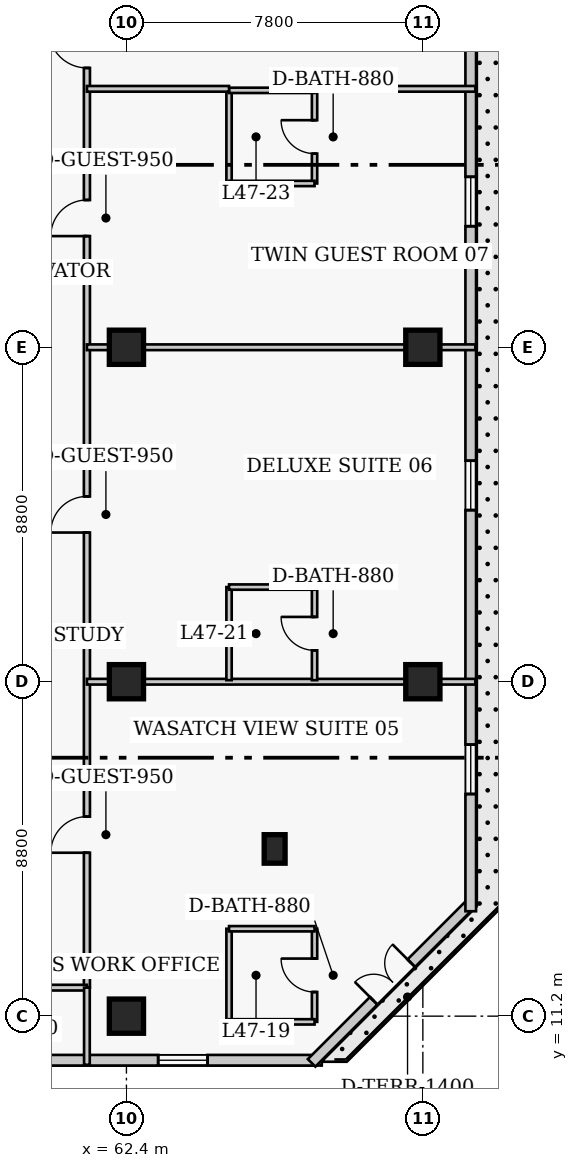
"""IFC4 building model, lengths in metres.
Left out: names, types, materials, properties, quantities, classifications, styles, units other than length and angle.
Written with IfcOpenShell. Run it as: python <this file> out.ifc"""

import sys

from ifc_helpers import new_model, si_unit, direction, frame, frame_2d, origin, origin_2d, place, context, subcontext, project, spatial, rectangle, extrude, element, fill, save


model = new_model("IFC4")
c1 = context("Model", 3, precision=1e-05, world=origin(), true_north=direction((0.0, 1.0)))
c2 = subcontext(c1, "Body", "Model", "MODEL_VIEW")
j1 = project(units=[si_unit("LENGTHUNIT", "METRE"), si_unit("PLANEANGLEUNIT", "RADIAN")], contexts=[c1])
p1 = place(None, origin())
s1 = spatial("IfcSite", under=j1, at=p1, CompositionType="ELEMENT")
p2 = place(p1, origin())
s2 = spatial("IfcBuilding", under=s1, at=p2, CompositionType="ELEMENT")
p3 = place(p2, frame((0.0, 0.0, 189.0)))
s3 = spatial("IfcBuildingStorey", under=s2, at=p3, CompositionType="ELEMENT", Elevation=189.0)
for number, where, z_axis, x_axis in (
    (1, (62.4, 11.2, 0.0), (0.0, 0.0, 1.0), (1.0, 0.0, 0.0)),
    (2, (62.4, 20.0, 0.0), (0.0, 0.0, 1.0), (1.0, 0.0, 0.0)),
    (3, (62.4, 28.8, 0.0), (0.0, 0.0, 1.0), (1.0, 0.0, 0.0)),
    (4, (70.2, 20.0, 0.0), (0.0, 0.0, 1.0), (1.0, 0.0, 0.0)),
    (5, (70.2, 28.8, 0.0), (0.0, 0.0, 1.0), (1.0, 0.0, 0.0)),
):
    element("IfcColumn", number, at=place(p3, frame(where, z_axis=z_axis, x_axis=x_axis)), inside=s3, PredefinedType="COLUMN", context=c2, shape_type="SweptSolid", body=[
        extrude(rectangle(XDim=0.9, YDim=0.9, at=origin_2d()), origin(), (0.0, 0.0, 1.0), 3.9),
    ])
p4 = place(p3, frame((66.3, 15.6, 0.0), z_axis=(0.0, 0.0, 1.0), x_axis=(1.0, 0.0, 0.0)))
e6 = element("IfcColumn", 6, at=p4, inside=s3, PredefinedType="PILASTER", context=c2, shape_type="SweptSolid", body=[
    extrude(rectangle(XDim=0.55, YDim=0.75, at=origin_2d()), origin(), (0.0, 0.0, 1.0), 3.9),
])
p5 = place(p3, frame((41.71, 10.04, 0.0), z_axis=(0.0, 0.0, 1.0), x_axis=(1.0, 0.0, 0.0)))
e7 = element("IfcWall", 7, at=p5, inside=s3, PredefinedType="SOLIDWALL", context=c2, shape_type="SweptSolid", body=[
    extrude(rectangle(XDim=25.83, YDim=0.28, at=frame_2d((12.915, 0.0))), origin(), (0.0, 0.0, 1.0), 3.65),
])
p6 = place(p5, frame((3.005, 0.0, 0.85)))
e8 = element("IfcOpeningElement", 8, at=p6, cuts=e7, PredefinedType="OPENING", context=c2, shape_type="SweptSolid", body=[
    extrude(rectangle(XDim=1.3, YDim=1.7, at=frame_2d((0.65, 0.85))), frame((0.0, 0.15, 0.0), z_axis=(0.0, -1.0, 0.0), x_axis=(1.0, 0.0, 0.0)), (0.0, 0.0, 1.0), 0.3),
])
p7 = place(p5, frame((13.415, 0.0, 0.85)))
e9 = element("IfcOpeningElement", 9, at=p7, cuts=e7, PredefinedType="OPENING", context=c2, shape_type="SweptSolid", body=[
    extrude(rectangle(XDim=1.3, YDim=1.7, at=frame_2d((0.65, 0.85))), frame((0.0, 0.15, 0.0), z_axis=(0.0, -1.0, 0.0), x_axis=(1.0, 0.0, 0.0)), (0.0, 0.0, 1.0), 0.3),
])
p8 = place(p5, frame((21.525, 0.0, 0.85)))
e10 = element("IfcOpeningElement", 10, at=p8, cuts=e7, PredefinedType="OPENING", context=c2, shape_type="SweptSolid", body=[
    extrude(rectangle(XDim=1.3, YDim=1.7, at=frame_2d((0.65, 0.85))), frame((0.0, 0.15, 0.0), z_axis=(0.0, -1.0, 0.0), x_axis=(1.0, 0.0, 0.0)), (0.0, 0.0, 1.0), 0.3),
])
p9 = place(p3, frame((67.273, 9.971, 0.0), z_axis=(0.0, 0.0, 1.0), x_axis=(0.707106781187, 0.707106781187, 0.0)))
e11 = element("IfcWall", 11, at=p9, inside=s3, PredefinedType="SOLIDWALL", context=c2, shape_type="SweptSolid", body=[
    extrude(rectangle(XDim=6.02, YDim=0.28, at=frame_2d((3.01, 0.0))), origin(), (0.0, 0.0, 1.0), 3.65),
])
p10 = place(p9, frame((2.31, 0.0, 0.0)))
e12 = element("IfcOpeningElement", 12, at=p10, cuts=e11, PredefinedType="OPENING", context=c2, shape_type="SweptSolid", body=[
    extrude(rectangle(XDim=1.4, YDim=2.15, at=frame_2d((0.7, 1.075))), frame((0.0, 0.15, 0.0), z_axis=(0.0, -1.0, 0.0), x_axis=(1.0, 0.0, 0.0)), (0.0, 0.0, 1.0), 0.3),
])
p11 = place(p3, frame((71.46, 13.96, 0.0), z_axis=(0.0, 0.0, 1.0), x_axis=(0.0, 1.0, 0.0)))
e13 = element("IfcWall", 13, at=p11, inside=s3, PredefinedType="SOLIDWALL", context=c2, shape_type="SweptSolid", body=[
    extrude(rectangle(XDim=29.88, YDim=0.28, at=frame_2d((14.94, 0.0))), origin(), (0.0, 0.0, 1.0), 3.65),
])
p12 = place(p11, frame((3.085, 0.0, 0.85)))
e14 = element("IfcOpeningElement", 14, at=p12, cuts=e13, PredefinedType="OPENING", context=c2, shape_type="SweptSolid", body=[
    extrude(rectangle(XDim=1.3, YDim=1.7, at=frame_2d((0.65, 0.85))), frame((0.0, 0.15, 0.0), z_axis=(0.0, -1.0, 0.0), x_axis=(1.0, 0.0, 0.0)), (0.0, 0.0, 1.0), 0.3),
])
p13 = place(p11, frame((10.555, 0.0, 0.85)))
e15 = element("IfcOpeningElement", 15, at=p13, cuts=e13, PredefinedType="OPENING", context=c2, shape_type="SweptSolid", body=[
    extrude(rectangle(XDim=1.3, YDim=1.7, at=frame_2d((0.65, 0.85))), frame((0.0, 0.15, 0.0), z_axis=(0.0, -1.0, 0.0), x_axis=(1.0, 0.0, 0.0)), (0.0, 0.0, 1.0), 0.3),
])
p14 = place(p11, frame((18.025, 0.0, 0.85)))
e16 = element("IfcOpeningElement", 16, at=p14, cuts=e13, PredefinedType="OPENING", context=c2, shape_type="SweptSolid", body=[
    extrude(rectangle(XDim=1.3, YDim=1.7, at=frame_2d((0.65, 0.85))), frame((0.0, 0.15, 0.0), z_axis=(0.0, -1.0, 0.0), x_axis=(1.0, 0.0, 0.0)), (0.0, 0.0, 1.0), 0.3),
])
p15 = place(p11, frame((25.495, 0.0, 0.85)))
e17 = element("IfcOpeningElement", 17, at=p15, cuts=e13, PredefinedType="OPENING", context=c2, shape_type="SweptSolid", body=[
    extrude(rectangle(XDim=1.3, YDim=1.7, at=frame_2d((0.65, 0.85))), frame((0.0, 0.15, 0.0), z_axis=(0.0, -1.0, 0.0), x_axis=(1.0, 0.0, 0.0)), (0.0, 0.0, 1.0), 0.3),
])
p16 = place(p3, frame((61.36, 11.95, 0.0), z_axis=(0.0, 0.0, 1.0), x_axis=(0.0, 1.0, 0.0)))
e18 = element("IfcWall", 18, at=p16, inside=s3, PredefinedType="PARTITIONING", context=c2, shape_type="SweptSolid", body=[
    extrude(rectangle(XDim=28.7, YDim=0.16, at=frame_2d((14.35, 0.0))), origin(), (0.0, 0.0, 1.0), 3.65),
])
p17 = place(p16, frame((3.55, 0.0, 0.0)))
e19 = element("IfcOpeningElement", 19, at=p17, cuts=e18, PredefinedType="OPENING", context=c2, shape_type="SweptSolid", body=[
    extrude(rectangle(XDim=0.95, YDim=2.1, at=frame_2d((0.475, 1.05))), frame((0.0, 0.09, 0.0), z_axis=(0.0, -1.0, 0.0), x_axis=(1.0, 0.0, 0.0)), (0.0, 0.0, 1.0), 0.18),
])
p18 = place(p16, frame((11.975, 0.0, 0.0)))
e20 = element("IfcOpeningElement", 20, at=p18, cuts=e18, PredefinedType="OPENING", context=c2, shape_type="SweptSolid", body=[
    extrude(rectangle(XDim=0.95, YDim=2.1, at=frame_2d((0.475, 1.05))), frame((0.0, 0.09, 0.0), z_axis=(0.0, -1.0, 0.0), x_axis=(1.0, 0.0, 0.0)), (0.0, 0.0, 1.0), 0.18),
])
p19 = place(p16, frame((19.775, 0.0, 0.0)))
e21 = element("IfcOpeningElement", 21, at=p19, cuts=e18, PredefinedType="OPENING", context=c2, shape_type="SweptSolid", body=[
    extrude(rectangle(XDim=0.95, YDim=2.1, at=frame_2d((0.475, 1.05))), frame((0.0, 0.09, 0.0), z_axis=(0.0, -1.0, 0.0), x_axis=(1.0, 0.0, 0.0)), (0.0, 0.0, 1.0), 0.18),
])
p20 = place(p16, frame((24.2, 0.0, 0.0)))
e22 = element("IfcOpeningElement", 22, at=p20, cuts=e18, PredefinedType="OPENING", context=c2, shape_type="SweptSolid", body=[
    extrude(rectangle(XDim=1.0, YDim=2.15, at=frame_2d((0.5, 1.075))), frame((0.0, 0.09, 0.0), z_axis=(0.0, -1.0, 0.0), x_axis=(1.0, 0.0, 0.0)), (0.0, 0.0, 1.0), 0.18),
])
p21 = place(p3, frame((59.14, 11.95, 0.0), z_axis=(0.0, 0.0, 1.0), x_axis=(1.0, 0.0, 0.0)))
e23 = element("IfcWall", 23, at=p21, inside=s3, PredefinedType="PARTITIONING", context=c2, shape_type="SweptSolid", body=[
    extrude(rectangle(XDim=2.22, YDim=0.15, at=frame_2d((1.11, 0.0))), origin(), (0.0, 0.0, 1.0), 3.65),
])
p22 = place(p3, frame((61.36, 9.92, 0.0), z_axis=(0.0, 0.0, 1.0), x_axis=(0.0, 1.0, 0.0)))
e24 = element("IfcWall", 24, at=p22, inside=s3, PredefinedType="PARTITIONING", context=c2, shape_type="SweptSolid", body=[
    extrude(rectangle(XDim=2.03, YDim=0.15, at=frame_2d((1.015, 0.0))), origin(), (0.0, 0.0, 1.0), 3.65),
])
p23 = place(p3, frame((65.1, 11.05, 0.0), z_axis=(0.0, 0.0, 1.0), x_axis=(0.0, 1.0, 0.0)))
e25 = element("IfcWall", 25, at=p23, inside=s3, PredefinedType="PLUMBINGWALL", context=c2, shape_type="SweptSolid", body=[
    extrude(rectangle(XDim=2.45, YDim=0.14, at=frame_2d((1.225, 0.0))), origin(), (0.0, 0.0, 1.0), 3.65),
])
p24 = place(p3, frame((67.35, 11.05, 0.0), z_axis=(0.0, 0.0, 1.0), x_axis=(0.0, 1.0, 0.0)))
e26 = element("IfcWall", 26, at=p24, inside=s3, PredefinedType="PLUMBINGWALL", context=c2, shape_type="SweptSolid", body=[
    extrude(rectangle(XDim=2.45, YDim=0.14, at=frame_2d((1.225, 0.0))), origin(), (0.0, 0.0, 1.0), 3.65),
])
p25 = place(p24, frame((0.785, 0.0, 0.0)))
e27 = element("IfcOpeningElement", 27, at=p25, cuts=e26, PredefinedType="OPENING", context=c2, shape_type="SweptSolid", body=[
    extrude(rectangle(XDim=0.88, YDim=2.05, at=frame_2d((0.44, 1.025))), frame((0.0, 0.08, 0.0), z_axis=(0.0, -1.0, 0.0), x_axis=(1.0, 0.0, 0.0)), (0.0, 0.0, 1.0), 0.16),
])
for number, where, z_axis, x_axis in (
    (28, (65.1, 11.05, 0.0), (0.0, 0.0, 1.0), (1.0, 0.0, 0.0)),
    (29, (65.1, 13.5, 0.0), (0.0, 0.0, 1.0), (1.0, 0.0, 0.0)),
):
    element("IfcWall", number, at=place(p3, frame(where, z_axis=z_axis, x_axis=x_axis)), inside=s3, PredefinedType="PLUMBINGWALL", context=c2, shape_type="SweptSolid", body=[
        extrude(rectangle(XDim=2.25, YDim=0.14, at=frame_2d((1.125, 0.0))), origin(), (0.0, 0.0, 1.0), 3.65),
    ])
p26 = place(p3, frame((61.36, 20.0, 0.0), z_axis=(0.0, 0.0, 1.0), x_axis=(1.0, 0.0, 0.0)))
e30 = element("IfcWall", 30, at=p26, inside=s3, PredefinedType="PARTITIONING", context=c2, shape_type="SweptSolid", body=[
    extrude(rectangle(XDim=10.22, YDim=0.15, at=frame_2d((5.11, 0.0))), origin(), (0.0, 0.0, 1.0), 2.878),
])
p27 = place(p3, frame((65.1, 20.04, 0.0), z_axis=(0.0, 0.0, 1.0), x_axis=(0.0, 1.0, 0.0)))
e31 = element("IfcWall", 31, at=p27, inside=s3, PredefinedType="PLUMBINGWALL", context=c2, shape_type="SweptSolid", body=[
    extrude(rectangle(XDim=2.45, YDim=0.14, at=frame_2d((1.225, 0.0))), origin(), (0.0, 0.0, 1.0), 3.65),
])
p28 = place(p3, frame((67.35, 20.04, 0.0), z_axis=(0.0, 0.0, 1.0), x_axis=(0.0, 1.0, 0.0)))
e32 = element("IfcWall", 32, at=p28, inside=s3, PredefinedType="PLUMBINGWALL", context=c2, shape_type="SweptSolid", body=[
    extrude(rectangle(XDim=2.45, YDim=0.14, at=frame_2d((1.225, 0.0))), origin(), (0.0, 0.0, 1.0), 3.65),
])
p29 = place(p28, frame((0.785, 0.0, 0.0)))
e33 = element("IfcOpeningElement", 33, at=p29, cuts=e32, PredefinedType="OPENING", context=c2, shape_type="SweptSolid", body=[
    extrude(rectangle(XDim=0.88, YDim=2.05, at=frame_2d((0.44, 1.025))), frame((0.0, 0.08, 0.0), z_axis=(0.0, -1.0, 0.0), x_axis=(1.0, 0.0, 0.0)), (0.0, 0.0, 1.0), 0.16),
])
p30 = place(p3, frame((65.1, 22.49, 0.0), z_axis=(0.0, 0.0, 1.0), x_axis=(1.0, 0.0, 0.0)))
e34 = element("IfcWall", 34, at=p30, inside=s3, PredefinedType="PLUMBINGWALL", context=c2, shape_type="SweptSolid", body=[
    extrude(rectangle(XDim=2.25, YDim=0.14, at=frame_2d((1.125, 0.0))), origin(), (0.0, 0.0, 1.0), 3.65),
])
p31 = place(p3, frame((61.36, 28.8, 0.0), z_axis=(0.0, 0.0, 1.0), x_axis=(1.0, 0.0, 0.0)))
e35 = element("IfcWall", 35, at=p31, inside=s3, PredefinedType="PARTITIONING", context=c2, shape_type="SweptSolid", body=[
    extrude(rectangle(XDim=10.22, YDim=0.15, at=frame_2d((5.11, 0.0))), origin(), (0.0, 0.0, 1.0), 2.878),
])
p32 = place(p3, frame((65.1, 33.11, 0.0), z_axis=(0.0, 0.0, 1.0), x_axis=(0.0, 1.0, 0.0)))
e36 = element("IfcWall", 36, at=p32, inside=s3, PredefinedType="PLUMBINGWALL", context=c2, shape_type="SweptSolid", body=[
    extrude(rectangle(XDim=2.45, YDim=0.14, at=frame_2d((1.225, 0.0))), origin(), (0.0, 0.0, 1.0), 3.65),
])
p33 = place(p3, frame((67.35, 33.11, 0.0), z_axis=(0.0, 0.0, 1.0), x_axis=(0.0, 1.0, 0.0)))
e37 = element("IfcWall", 37, at=p33, inside=s3, PredefinedType="PLUMBINGWALL", context=c2, shape_type="SweptSolid", body=[
    extrude(rectangle(XDim=2.45, YDim=0.14, at=frame_2d((1.225, 0.0))), origin(), (0.0, 0.0, 1.0), 3.65),
])
p34 = place(p33, frame((0.785, 0.0, 0.0)))
e38 = element("IfcOpeningElement", 38, at=p34, cuts=e37, PredefinedType="OPENING", context=c2, shape_type="SweptSolid", body=[
    extrude(rectangle(XDim=0.88, YDim=2.05, at=frame_2d((0.44, 1.025))), frame((0.0, 0.08, 0.0), z_axis=(0.0, -1.0, 0.0), x_axis=(1.0, 0.0, 0.0)), (0.0, 0.0, 1.0), 0.16),
])
for number, where, z_axis, x_axis in (
    (39, (65.1, 33.11, 0.0), (0.0, 0.0, 1.0), (1.0, 0.0, 0.0)),
    (40, (65.1, 35.56, 0.0), (0.0, 0.0, 1.0), (1.0, 0.0, 0.0)),
):
    element("IfcWall", number, at=place(p3, frame(where, z_axis=z_axis, x_axis=x_axis)), inside=s3, PredefinedType="PLUMBINGWALL", context=c2, shape_type="SweptSolid", body=[
        extrude(rectangle(XDim=2.25, YDim=0.14, at=frame_2d((1.125, 0.0))), origin(), (0.0, 0.0, 1.0), 3.65),
    ])
p35 = place(p3, frame((61.36, 35.6, 0.0), z_axis=(0.0, 0.0, 1.0), x_axis=(1.0, 0.0, 0.0)))
e41 = element("IfcWall", 41, at=p35, inside=s3, PredefinedType="PARTITIONING", context=c2, shape_type="SweptSolid", body=[
    extrude(rectangle(XDim=3.74, YDim=0.15, at=frame_2d((1.87, 0.0))), origin(), (0.0, 0.0, 1.0), 3.65),
])
p36 = place(p3, frame((67.35, 35.6, 0.0), z_axis=(0.0, 0.0, 1.0), x_axis=(1.0, 0.0, 0.0)))
e42 = element("IfcWall", 42, at=p36, inside=s3, PredefinedType="PARTITIONING", context=c2, shape_type="SweptSolid", body=[
    extrude(rectangle(XDim=4.23, YDim=0.15, at=frame_2d((2.115, 0.0))), origin(), (0.0, 0.0, 1.0), 3.65),
])
p37 = place(p8, origin())
e43 = element("IfcWindow", 43, at=p37, inside=s3, PartitioningType="SINGLE_PANEL", PredefinedType="WINDOW", context=c2, shape_type="SweptSolid", body=[
    extrude(rectangle(XDim=1.3, YDim=1.7, at=frame_2d((0.65, 0.85))), frame((0.0, 0.03, 0.0), z_axis=(0.0, -1.0, 0.0), x_axis=(1.0, 0.0, 0.0)), (0.0, 0.0, 1.0), 0.06),
])
fill(e10, e43)
p38 = place(p10, origin())
e44 = element("IfcDoor", 44, at=p38, inside=s3, OperationType="DOUBLE_DOOR_SINGLE_SWING", PredefinedType="DOOR", context=c2, shape_type="SweptSolid", body=[
    extrude(rectangle(XDim=1.4, YDim=2.15, at=frame_2d((0.7, 1.075))), frame((0.0, 0.025, 0.0), z_axis=(0.0, -1.0, 0.0), x_axis=(1.0, 0.0, 0.0)), (0.0, 0.0, 1.0), 0.05),
])
fill(e12, e44)
p39 = place(p12, origin())
e45 = element("IfcWindow", 45, at=p39, inside=s3, PartitioningType="SINGLE_PANEL", PredefinedType="WINDOW", context=c2, shape_type="SweptSolid", body=[
    extrude(rectangle(XDim=1.3, YDim=1.7, at=frame_2d((0.65, 0.85))), frame((0.0, 0.03, 0.0), z_axis=(0.0, -1.0, 0.0), x_axis=(1.0, 0.0, 0.0)), (0.0, 0.0, 1.0), 0.06),
])
fill(e14, e45)
p40 = place(p13, origin())
e46 = element("IfcWindow", 46, at=p40, inside=s3, PartitioningType="SINGLE_PANEL", PredefinedType="WINDOW", context=c2, shape_type="SweptSolid", body=[
    extrude(rectangle(XDim=1.3, YDim=1.7, at=frame_2d((0.65, 0.85))), frame((0.0, 0.03, 0.0), z_axis=(0.0, -1.0, 0.0), x_axis=(1.0, 0.0, 0.0)), (0.0, 0.0, 1.0), 0.06),
])
fill(e15, e46)
p41 = place(p14, origin())
e47 = element("IfcWindow", 47, at=p41, inside=s3, PartitioningType="SINGLE_PANEL", PredefinedType="WINDOW", context=c2, shape_type="SweptSolid", body=[
    extrude(rectangle(XDim=1.3, YDim=1.7, at=frame_2d((0.65, 0.85))), frame((0.0, 0.03, 0.0), z_axis=(0.0, -1.0, 0.0), x_axis=(1.0, 0.0, 0.0)), (0.0, 0.0, 1.0), 0.06),
])
fill(e16, e47)
p42 = place(p25, origin())
e48 = element("IfcDoor", 48, at=p42, inside=s3, OperationType="SINGLE_SWING_RIGHT", PredefinedType="DOOR", context=c2, shape_type="SweptSolid", body=[
    extrude(rectangle(XDim=0.88, YDim=2.05, at=frame_2d((0.44, 1.025))), frame((0.0, 0.025, 0.0), z_axis=(0.0, -1.0, 0.0), x_axis=(1.0, 0.0, 0.0)), (0.0, 0.0, 1.0), 0.05),
])
fill(e27, e48)
p43 = place(p17, origin())
e49 = element("IfcDoor", 49, at=p43, inside=s3, OperationType="SINGLE_SWING_LEFT", PredefinedType="DOOR", context=c2, shape_type="SweptSolid", body=[
    extrude(rectangle(XDim=0.95, YDim=2.1, at=frame_2d((0.475, 1.05))), frame((0.0, 0.025, 0.0), z_axis=(0.0, -1.0, 0.0), x_axis=(1.0, 0.0, 0.0)), (0.0, 0.0, 1.0), 0.05),
])
fill(e19, e49)
p44 = place(p29, origin())
e50 = element("IfcDoor", 50, at=p44, inside=s3, OperationType="SINGLE_SWING_RIGHT", PredefinedType="DOOR", context=c2, shape_type="SweptSolid", body=[
    extrude(rectangle(XDim=0.88, YDim=2.05, at=frame_2d((0.44, 1.025))), frame((0.0, 0.025, 0.0), z_axis=(0.0, -1.0, 0.0), x_axis=(1.0, 0.0, 0.0)), (0.0, 0.0, 1.0), 0.05),
])
fill(e33, e50)
p45 = place(p18, origin())
e51 = element("IfcDoor", 51, at=p45, inside=s3, OperationType="SINGLE_SWING_LEFT", PredefinedType="DOOR", context=c2, shape_type="SweptSolid", body=[
    extrude(rectangle(XDim=0.95, YDim=2.1, at=frame_2d((0.475, 1.05))), frame((0.0, 0.025, 0.0), z_axis=(0.0, -1.0, 0.0), x_axis=(1.0, 0.0, 0.0)), (0.0, 0.0, 1.0), 0.05),
])
fill(e20, e51)
p46 = place(p34, origin())
e52 = element("IfcDoor", 52, at=p46, inside=s3, OperationType="SINGLE_SWING_RIGHT", PredefinedType="DOOR", context=c2, shape_type="SweptSolid", body=[
    extrude(rectangle(XDim=0.88, YDim=2.05, at=frame_2d((0.44, 1.025))), frame((0.0, 0.025, 0.0), z_axis=(0.0, -1.0, 0.0), x_axis=(1.0, 0.0, 0.0)), (0.0, 0.0, 1.0), 0.05),
])
fill(e38, e52)
p47 = place(p19, origin())
e53 = element("IfcDoor", 53, at=p47, inside=s3, OperationType="SINGLE_SWING_LEFT", PredefinedType="DOOR", context=c2, shape_type="SweptSolid", body=[
    extrude(rectangle(XDim=0.95, YDim=2.1, at=frame_2d((0.475, 1.05))), frame((0.0, 0.025, 0.0), z_axis=(0.0, -1.0, 0.0), x_axis=(1.0, 0.0, 0.0)), (0.0, 0.0, 1.0), 0.05),
])
fill(e21, e53)
p48 = place(p20, origin())
e54 = element("IfcDoor", 54, at=p48, inside=s3, OperationType="SINGLE_SWING_RIGHT", PredefinedType="DOOR", context=c2, shape_type="SweptSolid", body=[
    extrude(rectangle(XDim=1.0, YDim=2.15, at=frame_2d((0.5, 1.075))), frame((0.0, 0.025, 0.0), z_axis=(0.0, -1.0, 0.0), x_axis=(1.0, 0.0, 0.0)), (0.0, 0.0, 1.0), 0.05),
])
fill(e22, e54)
save(model, sys.argv[1])
